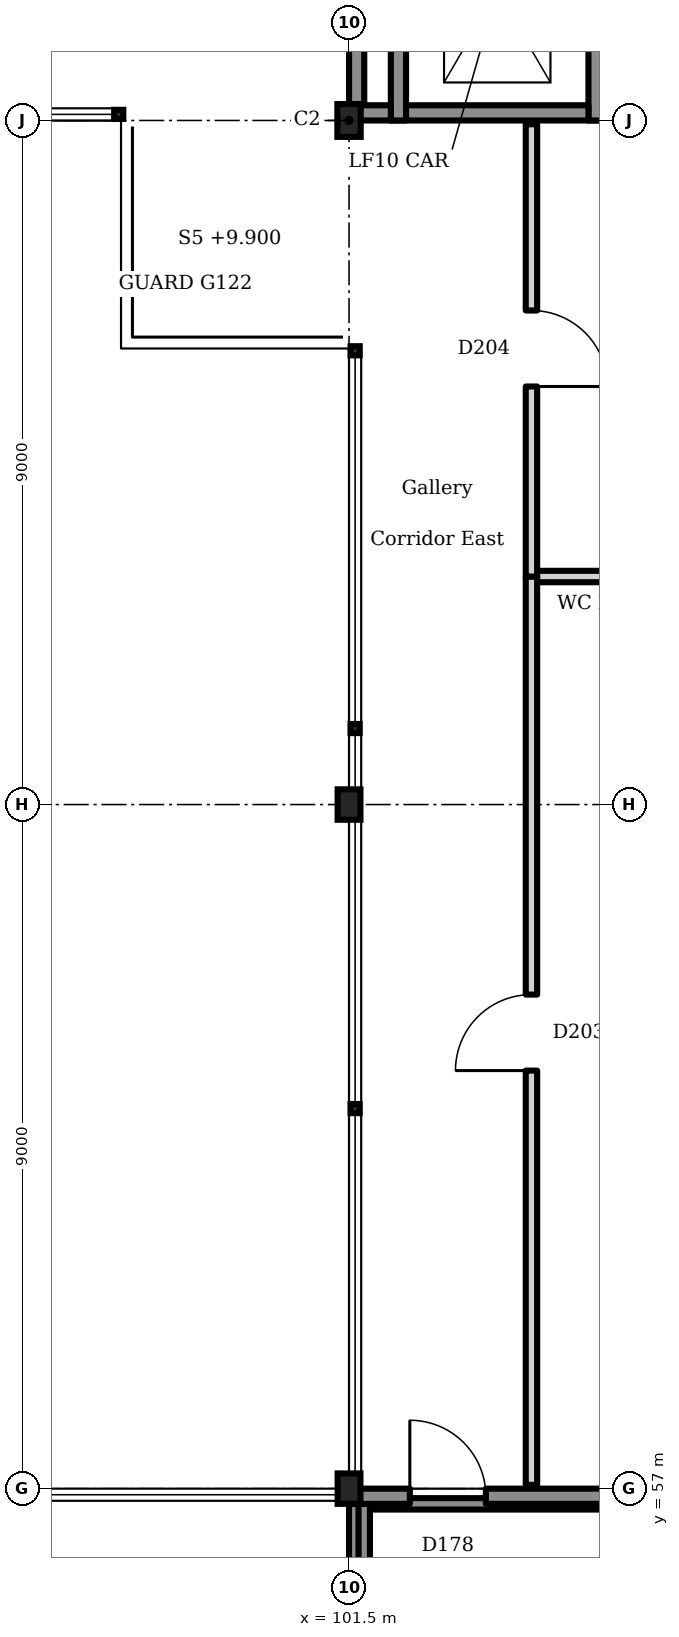
"""IFC4 building model, lengths in metres.
Left out: names, types, materials, properties, quantities, classifications, styles, units other than length and angle.
Written with IfcOpenShell. Run it as: python <this file> out.ifc"""

import sys

from ifc_helpers import new_model, si_unit, direction, frame, frame_2d, origin, origin_2d, place, context, subcontext, project, spatial, rectangle, i_section, extrude, element, fill, save


model = new_model("IFC4")
c1 = context("Model", 3, precision=1e-05, world=origin(), true_north=direction((0.0, 1.0)))
c2 = subcontext(c1, "Body", "Model", "MODEL_VIEW")
j1 = project(units=[si_unit("LENGTHUNIT", "METRE"), si_unit("PLANEANGLEUNIT", "RADIAN")], contexts=[c1])
p1 = place(None, origin())
s1 = spatial("IfcSite", under=j1, at=p1, CompositionType="ELEMENT")
p2 = place(p1, origin())
s2 = spatial("IfcBuilding", under=s1, at=p2, CompositionType="ELEMENT")
p3 = place(p2, frame((0.0, 0.0, 9.9)))
s3 = spatial("IfcBuildingStorey", under=s2, at=p3, CompositionType="ELEMENT", Elevation=9.9)
p4 = place(p3, frame((104.65, 75.1, 0.0), z_axis=(0.0, 0.0, 1.0), x_axis=(1.0, 0.0, 0.0)))
e1 = element("IfcWall", 1, at=p4, inside=s3, PredefinedType="SOLIDWALL", context=c2, shape_type="SweptSolid", body=[
    extrude(rectangle(XDim=2.6, YDim=0.2, at=frame_2d((1.3, 0.0))), origin(), (0.0, 0.0, 1.0), 4.5),
])
p5 = place(p3, frame((104.75, 75.0, 0.0), z_axis=(0.0, 0.0, 1.0), x_axis=(0.0, 1.0, 0.0)))
e2 = element("IfcWall", 2, at=p5, inside=s3, PredefinedType="SOLIDWALL", context=c2, shape_type="SweptSolid", body=[
    extrude(rectangle(XDim=3.4, YDim=0.2, at=frame_2d((1.7, 0.0))), origin(), (0.0, 0.0, 1.0), 4.5),
])
p6 = place(p3, frame((102.05, 75.1, 0.0), z_axis=(0.0, 0.0, 1.0), x_axis=(1.0, 0.0, 0.0)))
e3 = element("IfcWall", 3, at=p6, inside=s3, PredefinedType="SOLIDWALL", context=c2, shape_type="SweptSolid", body=[
    extrude(rectangle(XDim=2.6, YDim=0.2, at=frame_2d((1.3, 0.0))), origin(), (0.0, 0.0, 1.0), 4.5),
])
p7 = place(p3, frame((102.15, 75.0, 0.0), z_axis=(0.0, 0.0, 1.0), x_axis=(0.0, 1.0, 0.0)))
e4 = element("IfcWall", 4, at=p7, inside=s3, PredefinedType="SOLIDWALL", context=c2, shape_type="SweptSolid", body=[
    extrude(rectangle(XDim=3.4, YDim=0.2, at=frame_2d((1.7, 0.0))), origin(), (0.0, 0.0, 1.0), 4.5),
])
for number, where, z_axis, x_axis in (
    (5, (101.5, 57.0, 0.0), (0.0, 0.0, 1.0), (1.0, 0.0, 0.0)),
    (6, (101.5, 66.0, 0.0), (0.0, 0.0, 1.0), (1.0, 0.0, 0.0)),
):
    element("IfcColumn", number, at=place(p3, frame(where, z_axis=z_axis, x_axis=x_axis)), inside=s3, PredefinedType="COLUMN", context=c2, shape_type="SweptSolid", body=[
        extrude(i_section(OverallWidth=0.3, OverallDepth=0.4, WebThickness=0.013, FlangeThickness=0.024, FilletRadius=0.027, at=origin_2d()), origin(), (0.0, 0.0, 1.0), 4.25),
    ])
p8 = place(p3, frame((101.5, 75.0, 0.0), z_axis=(0.0, 0.0, 1.0), x_axis=(1.0, 0.0, 0.0)))
e7 = element("IfcColumn", 7, at=p8, inside=s3, PredefinedType="COLUMN", context=c2, shape_type="SweptSolid", body=[
    extrude(i_section(OverallWidth=0.307, OverallDepth=0.432, WebThickness=0.021, FlangeThickness=0.04, FilletRadius=0.027, at=origin_2d()), origin(), (0.0, 0.0, 1.0), 4.5),
])
p9 = place(p3, frame((101.6, 48.2, 0.0), z_axis=(0.0, 0.0, 1.0), x_axis=(0.0, 1.0, 0.0)))
e8 = element("IfcWall", 8, at=p9, inside=s3, PredefinedType="SHEAR", context=c2, shape_type="SweptSolid", body=[
    extrude(rectangle(XDim=8.6, YDim=0.2, at=frame_2d((4.3, 0.0))), origin(), (0.0, 0.0, 1.0), 4.0),
])
p10 = place(p9, frame((2.9, 0.0, 0.0)))
e9 = element("IfcOpeningElement", 9, at=p10, cuts=e8, PredefinedType="OPENING", context=c2, shape_type="SweptSolid", body=[
    extrude(rectangle(XDim=1.8, YDim=2.1, at=frame_2d((0.9, 1.05))), frame((0.0, 0.11, 0.0), z_axis=(0.0, -1.0, 0.0), x_axis=(1.0, 0.0, 0.0)), (0.0, 0.0, 1.0), 0.22),
])
for number, where, z_axis, x_axis in (
    (10, (101.7, 56.8, 4.25), (0.0, 0.0, 1.0), (1.0, 0.0, 0.0)),
    (11, (101.7, 48.2, 4.25), (0.0, 0.0, 1.0), (0.0, 1.0, 0.0)),
):
    element("IfcWall", number, at=place(p3, frame(where, z_axis=z_axis, x_axis=x_axis)), inside=s3, PredefinedType="SOLIDWALL", context=c2, shape_type="SweptSolid", body=[
        extrude(rectangle(XDim=8.6, YDim=0.15, at=frame_2d((4.3, 0.0))), origin(), (0.0, 0.0, 1.0), 0.15),
    ])
p11 = place(p3, frame((101.5, 75.1, 0.0), z_axis=(0.0, 0.0, 1.0), x_axis=(1.0, 0.0, 0.0)))
e12 = element("IfcWall", 12, at=p11, inside=s3, PredefinedType="SHEAR", context=c2, shape_type="SweptSolid", body=[
    extrude(rectangle(XDim=0.55, YDim=0.2, at=frame_2d((0.275, 0.0))), origin(), (0.0, 0.0, 1.0), 3.75),
])
p12 = place(p3, frame((101.6, 75.2, 0.0), z_axis=(0.0, 0.0, 1.0), x_axis=(0.0, 1.0, 0.0)))
e13 = element("IfcWall", 13, at=p12, inside=s3, PredefinedType="SHEAR", context=c2, shape_type="SweptSolid", body=[
    extrude(rectangle(XDim=8.6, YDim=0.2, at=frame_2d((4.3, 0.0))), origin(), (0.0, 0.0, 1.0), 3.75),
])
p13 = place(p12, frame((4.9, 0.0, 0.0)))
e14 = element("IfcOpeningElement", 14, at=p13, cuts=e13, PredefinedType="OPENING", context=c2, shape_type="SweptSolid", body=[
    extrude(rectangle(XDim=1.8, YDim=2.1, at=frame_2d((0.9, 1.05))), frame((0.0, 0.11, 0.0), z_axis=(0.0, -1.0, 0.0), x_axis=(1.0, 0.0, 0.0)), (0.0, 0.0, 1.0), 0.22),
])
p14 = place(p3, frame((101.5, 56.9, 0.0), z_axis=(0.0, 0.0, 1.0), x_axis=(1.0, 0.0, 0.0)))
e15 = element("IfcWall", 15, at=p14, inside=s3, PredefinedType="SHEAR", context=c2, shape_type="SweptSolid", body=[
    extrude(rectangle(XDim=9.0, YDim=0.2, at=frame_2d((4.5, 0.0))), origin(), (0.0, 0.0, 1.0), 4.0),
])
p15 = place(p14, frame((0.8, 0.0, 0.0)))
e16 = element("IfcOpeningElement", 16, at=p15, cuts=e15, PredefinedType="OPENING", context=c2, shape_type="SweptSolid", body=[
    extrude(rectangle(XDim=1.0, YDim=2.1, at=frame_2d((0.5, 1.05))), frame((0.0, 0.11, 0.0), z_axis=(0.0, -1.0, 0.0), x_axis=(1.0, 0.0, 0.0)), (0.0, 0.0, 1.0), 0.22),
])
p16 = place(p3, frame((103.9, 69.0, 0.0), z_axis=(0.0, 0.0, 1.0), x_axis=(1.0, 0.0, 0.0)))
e17 = element("IfcWall", 17, at=p16, inside=s3, PredefinedType="PARTITIONING", context=c2, shape_type="SweptSolid", body=[
    extrude(rectangle(XDim=2.0, YDim=0.15, at=frame_2d((1.0, 0.0))), origin(), (0.0, 0.0, 1.0), 3.65),
])
p17 = place(p3, frame((103.9, 57.05, 0.0), z_axis=(0.0, 0.0, 1.0), x_axis=(0.0, 1.0, 0.0)))
e18 = element("IfcWall", 18, at=p17, inside=s3, PredefinedType="PARTITIONING", context=c2, shape_type="SweptSolid", body=[
    extrude(rectangle(XDim=11.95, YDim=0.15, at=frame_2d((5.975, 0.0))), origin(), (0.0, 0.0, 1.0), 3.65),
])
p18 = place(p17, frame((5.45, 0.0, 0.0)))
e19 = element("IfcOpeningElement", 19, at=p18, cuts=e18, PredefinedType="OPENING", context=c2, shape_type="SweptSolid", body=[
    extrude(rectangle(XDim=1.0, YDim=2.1, at=frame_2d((0.5, 1.05))), frame((0.0, 0.085, 0.0), z_axis=(0.0, -1.0, 0.0), x_axis=(1.0, 0.0, 0.0)), (0.0, 0.0, 1.0), 0.17),
])
p19 = place(p3, frame((103.9, 69.0, 0.0), z_axis=(0.0, 0.0, 1.0), x_axis=(0.0, 1.0, 0.0)))
e20 = element("IfcWall", 20, at=p19, inside=s3, PredefinedType="PARTITIONING", context=c2, shape_type="SweptSolid", body=[
    extrude(rectangle(XDim=5.95, YDim=0.15, at=frame_2d((2.975, 0.0))), origin(), (0.0, 0.0, 1.0), 3.65),
])
p20 = place(p19, frame((2.5, 0.0, 0.0)))
e21 = element("IfcOpeningElement", 21, at=p20, cuts=e20, PredefinedType="OPENING", context=c2, shape_type="SweptSolid", body=[
    extrude(rectangle(XDim=1.0, YDim=2.1, at=frame_2d((0.5, 1.05))), frame((0.0, 0.085, 0.0), z_axis=(0.0, -1.0, 0.0), x_axis=(1.0, 0.0, 0.0)), (0.0, 0.0, 1.0), 0.17),
])
p21 = place(p15, origin())
e22 = element("IfcDoor", 22, at=p21, inside=s3, OperationType="SINGLE_SWING_RIGHT", PredefinedType="DOOR", context=c2, shape_type="SweptSolid", body=[
    extrude(rectangle(XDim=1.0, YDim=2.1, at=frame_2d((0.5, 1.05))), frame((0.0, 0.025, 0.0), z_axis=(0.0, -1.0, 0.0), x_axis=(1.0, 0.0, 0.0)), (0.0, 0.0, 1.0), 0.05),
])
fill(e16, e22)
p22 = place(p18, origin())
e23 = element("IfcDoor", 23, at=p22, inside=s3, OperationType="SINGLE_SWING_RIGHT", PredefinedType="DOOR", context=c2, shape_type="SweptSolid", body=[
    extrude(rectangle(XDim=1.0, YDim=2.1, at=frame_2d((0.5, 1.05))), frame((0.0, 0.025, 0.0), z_axis=(0.0, -1.0, 0.0), x_axis=(1.0, 0.0, 0.0)), (0.0, 0.0, 1.0), 0.05),
])
fill(e19, e23)
p23 = place(p20, frame((1.0, 0.0, 0.0), z_axis=(0.0, 0.0, 1.0), x_axis=(-1.0, 0.0, 0.0)))
e24 = element("IfcDoor", 24, at=p23, inside=s3, OperationType="SINGLE_SWING_LEFT", PredefinedType="DOOR", context=c2, shape_type="SweptSolid", body=[
    extrude(rectangle(XDim=1.0, YDim=2.1, at=frame_2d((0.5, 1.05))), frame((0.0, 0.025, 0.0), z_axis=(0.0, -1.0, 0.0), x_axis=(1.0, 0.0, 0.0)), (0.0, 0.0, 1.0), 0.05),
])
fill(e21, e24)
save(model, sys.argv[1])
